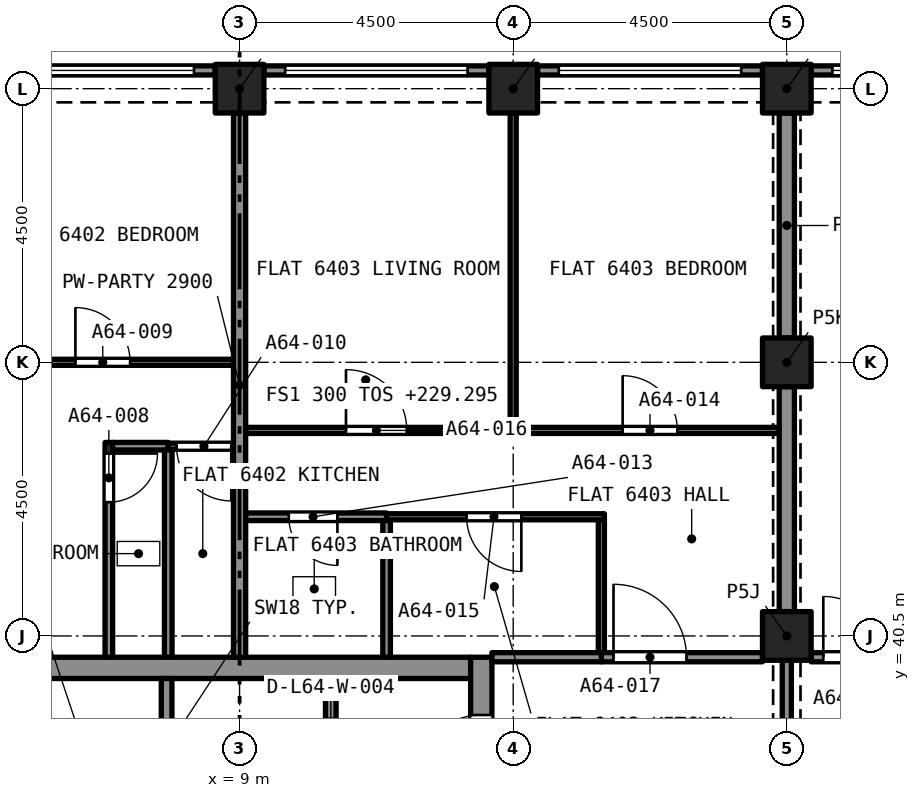
"""IFC4 building model, lengths in metres.
Left out: names, types, materials, properties, quantities, classifications, styles, units other than length and angle.
Written with IfcOpenShell. Run it as: python <this file> out.ifc"""

import sys

from ifc_helpers import new_model, si_unit, direction, frame, frame_2d, origin, origin_2d, place, context, subcontext, project, spatial, rectangle, extrude, element, fill, save


model = new_model("IFC4")
c1 = context("Model", 3, precision=1e-05, world=origin(), true_north=direction((0.0, 1.0)))
c2 = subcontext(c1, "Body", "Model", "MODEL_VIEW")
j1 = project(units=[si_unit("LENGTHUNIT", "METRE"), si_unit("PLANEANGLEUNIT", "RADIAN")], contexts=[c1])
p1 = place(None, origin())
s1 = spatial("IfcSite", under=j1, at=p1, CompositionType="ELEMENT")
p2 = place(p1, origin())
s2 = spatial("IfcBuilding", under=s1, at=p2, CompositionType="ELEMENT")
p3 = place(p2, frame((0.0, 0.0, 229.295)))
s3 = spatial("IfcBuildingStorey", under=s2, at=p3, CompositionType="ELEMENT", Elevation=229.295)
for number, where, z_axis, x_axis in (
    (1, (18.0, 40.5, 0.0), (0.0, 0.0, 1.0), (1.0, 0.0, 0.0)),
    (2, (18.0, 45.0, 0.0), (0.0, 0.0, 1.0), (1.0, 0.0, 0.0)),
    (3, (9.0, 49.5, 0.0), (0.0, 0.0, 1.0), (1.0, 0.0, 0.0)),
    (4, (13.5, 49.5, 0.0), (0.0, 0.0, 1.0), (1.0, 0.0, 0.0)),
    (5, (18.0, 49.5, 0.0), (0.0, 0.0, 1.0), (1.0, 0.0, 0.0)),
):
    element("IfcColumn", number, at=place(p3, frame(where, z_axis=z_axis, x_axis=x_axis)), inside=s3, PredefinedType="COLUMN", context=c2, shape_type="SweptSolid", body=[
        extrude(rectangle(XDim=0.8, YDim=0.8, at=origin_2d()), origin(), (0.0, 0.0, 1.0), 3.2),
    ])
p4 = place(p3, frame((5.2, 39.975, 0.0), z_axis=(0.0, 0.0, 1.0), x_axis=(1.0, 0.0, 0.0)))
e6 = element("IfcWall", 6, at=p4, inside=s3, PredefinedType="SOLIDWALL", context=c2, shape_type="SweptSolid", body=[
    extrude(rectangle(XDim=7.6, YDim=0.35, at=frame_2d((3.8, 0.0))), origin(), (0.0, 0.0, 1.0), 3.2),
])
p5 = place(p3, frame((12.975, 27.35, 0.0), z_axis=(0.0, 0.0, 1.0), x_axis=(0.0, 1.0, 0.0)))
e7 = element("IfcWall", 7, at=p5, inside=s3, PredefinedType="SOLIDWALL", context=c2, shape_type="SweptSolid", body=[
    extrude(rectangle(XDim=12.8, YDim=0.35, at=frame_2d((6.4, 0.0))), origin(), (0.0, 0.0, 1.0), 3.2),
])
p6 = place(p5, frame((10.75, 0.0, 0.0)))
e8 = element("IfcOpeningElement", 8, at=p6, cuts=e7, PredefinedType="OPENING", context=c2, shape_type="SweptSolid", body=[
    extrude(rectangle(XDim=1.1, YDim=2.1, at=frame_2d((0.55, 1.05))), frame((0.0, 0.185, 0.0), z_axis=(0.0, -1.0, 0.0), x_axis=(1.0, 0.0, 0.0)), (0.0, 0.0, 1.0), 0.37),
])
p7 = place(p5, frame((8.6, 0.0, 0.0)))
e9 = element("IfcOpeningElement", 9, at=p7, cuts=e7, PredefinedType="OPENING", context=c2, shape_type="SweptSolid", body=[
    extrude(rectangle(XDim=1.2, YDim=2.1, at=frame_2d((0.6, 1.05))), frame((0.0, 0.185, 0.0), z_axis=(0.0, -1.0, 0.0), x_axis=(1.0, 0.0, 0.0)), (0.0, 0.0, 1.0), 0.37),
])
p8 = place(p3, frame((18.4, 49.8, 0.0), z_axis=(0.0, 0.0, 1.0), x_axis=(1.0, 0.0, 0.0)))
e10 = element("IfcWall", 10, at=p8, inside=s3, PredefinedType="SOLIDWALL", context=c2, shape_type="SweptSolid", body=[
    extrude(rectangle(XDim=3.7, YDim=0.15, at=frame_2d((1.85, 0.0))), origin(), (0.0, 0.0, 1.0), 3.2),
])
p9 = place(p8, frame((0.35, 0.0, 0.45)))
e11 = element("IfcOpeningElement", 11, at=p9, cuts=e10, PredefinedType="OPENING", context=c2, shape_type="SweptSolid", body=[
    extrude(rectangle(XDim=3.0, YDim=1.95, at=frame_2d((1.5, 0.975))), frame((0.0, 0.085, 0.0), z_axis=(0.0, -1.0, 0.0), x_axis=(1.0, 0.0, 0.0)), (0.0, 0.0, 1.0), 0.17),
])
p10 = place(p3, frame((13.9, 49.8, 0.0), z_axis=(0.0, 0.0, 1.0), x_axis=(1.0, 0.0, 0.0)))
e12 = element("IfcWall", 12, at=p10, inside=s3, PredefinedType="SOLIDWALL", context=c2, shape_type="SweptSolid", body=[
    extrude(rectangle(XDim=3.7, YDim=0.15, at=frame_2d((1.85, 0.0))), origin(), (0.0, 0.0, 1.0), 3.2),
])
p11 = place(p10, frame((0.35, 0.0, 0.45)))
e13 = element("IfcOpeningElement", 13, at=p11, cuts=e12, PredefinedType="OPENING", context=c2, shape_type="SweptSolid", body=[
    extrude(rectangle(XDim=3.0, YDim=1.95, at=frame_2d((1.5, 0.975))), frame((0.0, 0.085, 0.0), z_axis=(0.0, -1.0, 0.0), x_axis=(1.0, 0.0, 0.0)), (0.0, 0.0, 1.0), 0.17),
])
p12 = place(p3, frame((9.4, 49.8, 0.0), z_axis=(0.0, 0.0, 1.0), x_axis=(1.0, 0.0, 0.0)))
e14 = element("IfcWall", 14, at=p12, inside=s3, PredefinedType="SOLIDWALL", context=c2, shape_type="SweptSolid", body=[
    extrude(rectangle(XDim=3.7, YDim=0.15, at=frame_2d((1.85, 0.0))), origin(), (0.0, 0.0, 1.0), 3.2),
])
p13 = place(p12, frame((0.35, 0.0, 0.45)))
e15 = element("IfcOpeningElement", 15, at=p13, cuts=e14, PredefinedType="OPENING", context=c2, shape_type="SweptSolid", body=[
    extrude(rectangle(XDim=3.0, YDim=1.95, at=frame_2d((1.5, 0.975))), frame((0.0, 0.085, 0.0), z_axis=(0.0, -1.0, 0.0), x_axis=(1.0, 0.0, 0.0)), (0.0, 0.0, 1.0), 0.17),
])
p14 = place(p3, frame((4.9, 49.8, 0.0), z_axis=(0.0, 0.0, 1.0), x_axis=(1.0, 0.0, 0.0)))
e16 = element("IfcWall", 16, at=p14, inside=s3, PredefinedType="SOLIDWALL", context=c2, shape_type="SweptSolid", body=[
    extrude(rectangle(XDim=3.7, YDim=0.15, at=frame_2d((1.85, 0.0))), origin(), (0.0, 0.0, 1.0), 3.2),
])
p15 = place(p14, frame((0.35, 0.0, 0.45)))
e17 = element("IfcOpeningElement", 17, at=p15, cuts=e16, PredefinedType="OPENING", context=c2, shape_type="SweptSolid", body=[
    extrude(rectangle(XDim=3.0, YDim=1.95, at=frame_2d((1.5, 0.975))), frame((0.0, 0.085, 0.0), z_axis=(0.0, -1.0, 0.0), x_axis=(1.0, 0.0, 0.0)), (0.0, 0.0, 1.0), 0.17),
])
p16 = place(p3, frame((6.85, 43.683, 0.0), z_axis=(0.0, 0.0, 1.0), x_axis=(0.0, -1.0, 0.0)))
e18 = element("IfcWall", 18, at=p16, inside=s3, PredefinedType="PARTITIONING", context=c2, shape_type="SweptSolid", body=[
    extrude(rectangle(XDim=3.533, YDim=0.125, at=frame_2d((1.766, 0.0))), origin(), (0.0, 0.0, 1.0), 2.9),
])
p17 = place(p16, frame((0.183, 0.0, 0.0)))
e19 = element("IfcOpeningElement", 19, at=p17, cuts=e18, PredefinedType="OPENING", context=c2, shape_type="SweptSolid", body=[
    extrude(rectangle(XDim=0.8, YDim=2.1, at=frame_2d((0.4, 1.05))), frame((0.0, 0.073, 0.0), z_axis=(0.0, -1.0, 0.0), x_axis=(1.0, 0.0, 0.0)), (0.0, 0.0, 1.0), 0.145),
])
p18 = place(p3, frame((6.913, 43.62, 0.0), z_axis=(0.0, 0.0, 1.0), x_axis=(1.0, 0.0, 0.0)))
e20 = element("IfcWall", 20, at=p18, inside=s3, PredefinedType="PARTITIONING", context=c2, shape_type="SweptSolid", body=[
    extrude(rectangle(XDim=0.915, YDim=0.125, at=frame_2d((0.458, 0.0))), origin(), (0.0, 0.0, 1.0), 2.9),
])
p19 = place(p3, frame((7.827, 40.15, 0.0), z_axis=(0.0, 0.0, 1.0), x_axis=(0.0, 1.0, 0.0)))
e21 = element("IfcWall", 21, at=p19, inside=s3, PredefinedType="PARTITIONING", context=c2, shape_type="SweptSolid", body=[
    extrude(rectangle(XDim=3.408, YDim=0.125, at=frame_2d((1.704, 0.0))), origin(), (0.0, 0.0, 1.0), 2.9),
])
p20 = place(p3, frame((4.5, 45.0, 0.0), z_axis=(0.0, 0.0, 1.0), x_axis=(1.0, 0.0, 0.0)))
e22 = element("IfcWall", 22, at=p20, inside=s3, PredefinedType="PARTITIONING", context=c2, shape_type="SweptSolid", body=[
    extrude(rectangle(XDim=4.4, YDim=0.1, at=frame_2d((2.2, 0.0))), origin(), (0.0, 0.0, 1.0), 2.9),
])
p21 = place(p20, frame((1.8, 0.0, 0.0)))
e23 = element("IfcOpeningElement", 23, at=p21, cuts=e22, PredefinedType="OPENING", context=c2, shape_type="SweptSolid", body=[
    extrude(rectangle(XDim=0.9, YDim=2.1, at=frame_2d((0.45, 1.05))), frame((0.0, 0.06, 0.0), z_axis=(0.0, -1.0, 0.0), x_axis=(1.0, 0.0, 0.0)), (0.0, 0.0, 1.0), 0.12),
])
p22 = place(p3, frame((8.9, 43.62, 0.0), z_axis=(0.0, 0.0, 1.0), x_axis=(-1.0, 0.0, 0.0)))
e24 = element("IfcWall", 24, at=p22, inside=s3, PredefinedType="PARTITIONING", context=c2, shape_type="SweptSolid", body=[
    extrude(rectangle(XDim=1.073, YDim=0.1, at=frame_2d((0.536, 0.0))), origin(), (0.0, 0.0, 1.0), 2.9),
])
p23 = place(p22, frame((0.036, 0.0, 0.0)))
e25 = element("IfcOpeningElement", 25, at=p23, cuts=e24, PredefinedType="OPENING", context=c2, shape_type="SweptSolid", body=[
    extrude(rectangle(XDim=0.9, YDim=2.1, at=frame_2d((0.45, 1.05))), frame((0.0, 0.06, 0.0), z_axis=(0.0, -1.0, 0.0), x_axis=(1.0, 0.0, 0.0)), (0.0, 0.0, 1.0), 0.12),
])
p24 = place(p3, frame((9.0, 40.15, 0.0), z_axis=(0.0, 0.0, 1.0), x_axis=(0.0, 1.0, 0.0)))
e26 = element("IfcWall", 26, at=p24, inside=s3, PredefinedType="PARTITIONING", context=c2, shape_type="SweptSolid", body=[
    extrude(rectangle(XDim=8.95, YDim=0.2, at=frame_2d((4.475, 0.0))), origin(), (0.0, 0.0, 1.0), 2.9),
])
p25 = place(p3, frame((11.418, 42.46, 0.0), z_axis=(0.0, 0.0, 1.0), x_axis=(-1.0, 0.0, 0.0)))
e27 = element("IfcWall", 27, at=p25, inside=s3, PredefinedType="PARTITIONING", context=c2, shape_type="SweptSolid", body=[
    extrude(rectangle(XDim=2.318, YDim=0.125, at=frame_2d((1.159, 0.0))), origin(), (0.0, 0.0, 1.0), 2.9),
])
p26 = place(p25, frame((0.809, 0.0, 0.0)))
e28 = element("IfcOpeningElement", 28, at=p26, cuts=e27, PredefinedType="OPENING", context=c2, shape_type="SweptSolid", body=[
    extrude(rectangle(XDim=0.8, YDim=2.1, at=frame_2d((0.4, 1.05))), frame((0.0, 0.073, 0.0), z_axis=(0.0, -1.0, 0.0), x_axis=(1.0, 0.0, 0.0)), (0.0, 0.0, 1.0), 0.145),
])
p27 = place(p3, frame((11.418, 40.15, 0.0), z_axis=(0.0, 0.0, 1.0), x_axis=(0.0, 1.0, 0.0)))
e29 = element("IfcWall", 29, at=p27, inside=s3, PredefinedType="PARTITIONING", context=c2, shape_type="SweptSolid", body=[
    extrude(rectangle(XDim=2.248, YDim=0.125, at=frame_2d((1.124, 0.0))), origin(), (0.0, 0.0, 1.0), 2.9),
])
p28 = place(p3, frame((13.5, 43.88, 0.0), z_axis=(0.0, 0.0, 1.0), x_axis=(1.0, 0.0, 0.0)))
e30 = element("IfcWall", 30, at=p28, inside=s3, PredefinedType="PARTITIONING", context=c2, shape_type="SweptSolid", body=[
    extrude(rectangle(XDim=4.375, YDim=0.1, at=frame_2d((2.188, 0.0))), origin(), (0.0, 0.0, 1.0), 2.9),
])
p29 = place(p28, frame((1.8, 0.0, 0.0)))
e31 = element("IfcOpeningElement", 31, at=p29, cuts=e30, PredefinedType="OPENING", context=c2, shape_type="SweptSolid", body=[
    extrude(rectangle(XDim=0.9, YDim=2.1, at=frame_2d((0.45, 1.05))), frame((0.0, 0.06, 0.0), z_axis=(0.0, -1.0, 0.0), x_axis=(1.0, 0.0, 0.0)), (0.0, 0.0, 1.0), 0.12),
])
p30 = place(p3, frame((13.5, 43.93, 0.0), z_axis=(0.0, 0.0, 1.0), x_axis=(0.0, 1.0, 0.0)))
e32 = element("IfcWall", 32, at=p30, inside=s3, PredefinedType="PARTITIONING", context=c2, shape_type="SweptSolid", body=[
    extrude(rectangle(XDim=5.17, YDim=0.1, at=frame_2d((2.585, 0.0))), origin(), (0.0, 0.0, 1.0), 2.9),
])
p31 = place(p3, frame((18.0, 45.4, 0.0), z_axis=(0.0, 0.0, 1.0), x_axis=(0.0, 1.0, 0.0)))
e33 = element("IfcWall", 33, at=p31, inside=s3, PredefinedType="PARTITIONING", context=c2, shape_type="SweptSolid", body=[
    extrude(rectangle(XDim=3.7, YDim=0.25, at=frame_2d((1.85, 0.0))), origin(), (0.0, 0.0, 1.0), 2.38),
])
p32 = place(p3, frame((14.95, 40.225, 0.0), z_axis=(0.0, 0.0, 1.0), x_axis=(0.0, 1.0, 0.0)))
e34 = element("IfcWall", 34, at=p32, inside=s3, PredefinedType="PARTITIONING", context=c2, shape_type="SweptSolid", body=[
    extrude(rectangle(XDim=2.185, YDim=0.1, at=frame_2d((1.092, 0.0))), origin(), (0.0, 0.0, 1.0), 2.9),
])
p33 = place(p3, frame((15.0, 42.46, 0.0), z_axis=(0.0, 0.0, 1.0), x_axis=(-1.0, 0.0, 0.0)))
e35 = element("IfcWall", 35, at=p33, inside=s3, PredefinedType="PARTITIONING", context=c2, shape_type="SweptSolid", body=[
    extrude(rectangle(XDim=3.582, YDim=0.1, at=frame_2d((1.791, 0.0))), origin(), (0.0, 0.0, 1.0), 2.9),
])
p34 = place(p33, frame((1.366, 0.0, 0.0)))
e36 = element("IfcOpeningElement", 36, at=p34, cuts=e35, PredefinedType="OPENING", context=c2, shape_type="SweptSolid", body=[
    extrude(rectangle(XDim=0.9, YDim=2.1, at=frame_2d((0.45, 1.05))), frame((0.0, 0.06, 0.0), z_axis=(0.0, -1.0, 0.0), x_axis=(1.0, 0.0, 0.0)), (0.0, 0.0, 1.0), 0.12),
])
p35 = place(p3, frame((9.1, 43.88, 0.0), z_axis=(0.0, 0.0, 1.0), x_axis=(1.0, 0.0, 0.0)))
e37 = element("IfcWall", 37, at=p35, inside=s3, PredefinedType="PARTITIONING", context=c2, shape_type="SweptSolid", body=[
    extrude(rectangle(XDim=4.4, YDim=0.1, at=frame_2d((2.2, 0.0))), origin(), (0.0, 0.0, 1.0), 2.9),
])
p36 = place(p35, frame((1.65, 0.0, 0.0)))
e38 = element("IfcOpeningElement", 38, at=p36, cuts=e37, PredefinedType="OPENING", context=c2, shape_type="SweptSolid", body=[
    extrude(rectangle(XDim=1.0, YDim=2.1, at=frame_2d((0.5, 1.05))), frame((0.0, 0.06, 0.0), z_axis=(0.0, -1.0, 0.0), x_axis=(1.0, 0.0, 0.0)), (0.0, 0.0, 1.0), 0.12),
])
p37 = place(p3, frame((18.0, 40.9, 0.0), z_axis=(0.0, 0.0, 1.0), x_axis=(0.0, 1.0, 0.0)))
e39 = element("IfcWall", 39, at=p37, inside=s3, PredefinedType="PARTITIONING", context=c2, shape_type="SweptSolid", body=[
    extrude(rectangle(XDim=3.7, YDim=0.25, at=frame_2d((1.85, 0.0))), origin(), (0.0, 0.0, 1.0), 2.38),
])
p38 = place(p3, frame((14.95, 40.15, 0.0), z_axis=(0.0, 0.0, 1.0), x_axis=(1.0, 0.0, 0.0)))
e40 = element("IfcWall", 40, at=p38, inside=s3, PredefinedType="PARTITIONING", context=c2, shape_type="SweptSolid", body=[
    extrude(rectangle(XDim=2.65, YDim=0.15, at=frame_2d((1.325, 0.0))), origin(), (0.0, 0.0, 1.0), 2.9),
])
p39 = place(p38, frame((0.2, 0.0, 0.0)))
e41 = element("IfcOpeningElement", 41, at=p39, cuts=e40, PredefinedType="OPENING", context=c2, shape_type="SweptSolid", body=[
    extrude(rectangle(XDim=1.2, YDim=2.4, at=frame_2d((0.6, 1.2))), frame((0.0, 0.085, 0.0), z_axis=(0.0, -1.0, 0.0), x_axis=(1.0, 0.0, 0.0)), (0.0, 0.0, 1.0), 0.17),
])
p40 = place(p3, frame((13.15, 40.15, 0.0), z_axis=(0.0, 0.0, 1.0), x_axis=(1.0, 0.0, 0.0)))
e42 = element("IfcWall", 42, at=p40, inside=s3, PredefinedType="PARTITIONING", context=c2, shape_type="SweptSolid", body=[
    extrude(rectangle(XDim=1.8, YDim=0.15, at=frame_2d((0.9, 0.0))), origin(), (0.0, 0.0, 1.0), 2.9),
])
p41 = place(p3, frame((18.4, 40.15, 0.0), z_axis=(0.0, 0.0, 1.0), x_axis=(1.0, 0.0, 0.0)))
e43 = element("IfcWall", 43, at=p41, inside=s3, PredefinedType="PARTITIONING", context=c2, shape_type="SweptSolid", body=[
    extrude(rectangle(XDim=2.2, YDim=0.15, at=frame_2d((1.1, 0.0))), origin(), (0.0, 0.0, 1.0), 2.75),
])
p42 = place(p41, frame((0.2, 0.0, 0.0)))
e44 = element("IfcOpeningElement", 44, at=p42, cuts=e43, PredefinedType="OPENING", context=c2, shape_type="SweptSolid", body=[
    extrude(rectangle(XDim=1.0, YDim=2.1, at=frame_2d((0.5, 1.05))), frame((0.0, 0.085, 0.0), z_axis=(0.0, -1.0, 0.0), x_axis=(1.0, 0.0, 0.0)), (0.0, 0.0, 1.0), 0.17),
])
p43 = place(p3, frame((18.0, 40.1, 0.0), z_axis=(0.0, 0.0, 1.0), x_axis=(0.0, -1.0, 0.0)))
e45 = element("IfcWall", 45, at=p43, inside=s3, PredefinedType="PARTITIONING", context=c2, shape_type="SweptSolid", body=[
    extrude(rectangle(XDim=3.7, YDim=0.15, at=frame_2d((1.85, 0.0))), origin(), (0.0, 0.0, 1.0), 2.38),
])
p44 = place(p43, frame((1.25, 0.0, 0.0)))
e46 = element("IfcOpeningElement", 46, at=p44, cuts=e45, PredefinedType="OPENING", context=c2, shape_type="SweptSolid", body=[
    extrude(rectangle(XDim=1.2, YDim=2.1, at=frame_2d((0.6, 1.05))), frame((0.0, 0.085, 0.0), z_axis=(0.0, -1.0, 0.0), x_axis=(1.0, 0.0, 0.0)), (0.0, 0.0, 1.0), 0.17),
])
p45 = place(p3, frame((7.8, 37.5, 0.0), z_axis=(0.0, 0.0, 1.0), x_axis=(0.0, 1.0, 0.0)))
e47 = element("IfcWall", 47, at=p45, inside=s3, PredefinedType="SOLIDWALL", context=c2, shape_type="SweptSolid", body=[
    extrude(rectangle(XDim=2.3, YDim=0.175, at=frame_2d((1.15, 0.0))), origin(), (0.0, 0.0, 1.0), 2.9),
])
p46 = place(p3, frame((10.5, 37.5, 0.0), z_axis=(0.0, 0.0, 1.0), x_axis=(0.0, 1.0, 0.0)))
e48 = element("IfcWall", 48, at=p46, inside=s3, PredefinedType="SOLIDWALL", context=c2, shape_type="SweptSolid", body=[
    extrude(rectangle(XDim=2.3, YDim=0.175, at=frame_2d((1.15, 0.0))), origin(), (0.0, 0.0, 1.0), 2.9),
])
p47 = place(p46, frame((0.65, 0.0, 0.0)))
e49 = element("IfcOpeningElement", 49, at=p47, cuts=e48, PredefinedType="OPENING", context=c2, shape_type="SweptSolid", body=[
    extrude(rectangle(XDim=1.0, YDim=2.1, at=frame_2d((0.5, 1.05))), frame((0.0, 0.097, 0.0), z_axis=(0.0, -1.0, 0.0), x_axis=(1.0, 0.0, 0.0)), (0.0, 0.0, 1.0), 0.195),
])
p48 = place(p9, origin())
e50 = element("IfcWindow", 50, at=p48, inside=s3, PartitioningType="SINGLE_PANEL", PredefinedType="WINDOW", context=c2, shape_type="SweptSolid", body=[
    extrude(rectangle(XDim=3.0, YDim=1.95, at=frame_2d((1.5, 0.975))), frame((0.0, 0.03, 0.0), z_axis=(0.0, -1.0, 0.0), x_axis=(1.0, 0.0, 0.0)), (0.0, 0.0, 1.0), 0.06),
])
fill(e11, e50)
p49 = place(p11, origin())
e51 = element("IfcWindow", 51, at=p49, inside=s3, PartitioningType="SINGLE_PANEL", PredefinedType="WINDOW", context=c2, shape_type="SweptSolid", body=[
    extrude(rectangle(XDim=3.0, YDim=1.95, at=frame_2d((1.5, 0.975))), frame((0.0, 0.03, 0.0), z_axis=(0.0, -1.0, 0.0), x_axis=(1.0, 0.0, 0.0)), (0.0, 0.0, 1.0), 0.06),
])
fill(e13, e51)
p50 = place(p13, origin())
e52 = element("IfcWindow", 52, at=p50, inside=s3, PartitioningType="SINGLE_PANEL", PredefinedType="WINDOW", context=c2, shape_type="SweptSolid", body=[
    extrude(rectangle(XDim=3.0, YDim=1.95, at=frame_2d((1.5, 0.975))), frame((0.0, 0.03, 0.0), z_axis=(0.0, -1.0, 0.0), x_axis=(1.0, 0.0, 0.0)), (0.0, 0.0, 1.0), 0.06),
])
fill(e15, e52)
p51 = place(p15, origin())
e53 = element("IfcWindow", 53, at=p51, inside=s3, PartitioningType="SINGLE_PANEL", PredefinedType="WINDOW", context=c2, shape_type="SweptSolid", body=[
    extrude(rectangle(XDim=3.0, YDim=1.95, at=frame_2d((1.5, 0.975))), frame((0.0, 0.03, 0.0), z_axis=(0.0, -1.0, 0.0), x_axis=(1.0, 0.0, 0.0)), (0.0, 0.0, 1.0), 0.06),
])
fill(e17, e53)
p52 = place(p17, origin())
e54 = element("IfcDoor", 54, at=p52, inside=s3, OperationType="SINGLE_SWING_LEFT", PredefinedType="DOOR", context=c2, shape_type="SweptSolid", body=[
    extrude(rectangle(XDim=0.8, YDim=2.1, at=frame_2d((0.4, 1.05))), frame((0.0, 0.025, 0.0), z_axis=(0.0, -1.0, 0.0), x_axis=(1.0, 0.0, 0.0)), (0.0, 0.0, 1.0), 0.05),
])
fill(e19, e54)
p53 = place(p21, origin())
e55 = element("IfcDoor", 55, at=p53, inside=s3, OperationType="SINGLE_SWING_RIGHT", PredefinedType="DOOR", context=c2, shape_type="SweptSolid", body=[
    extrude(rectangle(XDim=0.9, YDim=2.1, at=frame_2d((0.45, 1.05))), frame((0.0, 0.025, 0.0), z_axis=(0.0, -1.0, 0.0), x_axis=(1.0, 0.0, 0.0)), (0.0, 0.0, 1.0), 0.05),
])
fill(e23, e55)
p54 = place(p23, origin())
e56 = element("IfcDoor", 56, at=p54, inside=s3, OperationType="SINGLE_SWING_LEFT", PredefinedType="DOOR", context=c2, shape_type="SweptSolid", body=[
    extrude(rectangle(XDim=0.9, YDim=2.1, at=frame_2d((0.45, 1.05))), frame((0.0, 0.025, 0.0), z_axis=(0.0, -1.0, 0.0), x_axis=(1.0, 0.0, 0.0)), (0.0, 0.0, 1.0), 0.05),
])
fill(e25, e56)
p55 = place(p26, origin())
e57 = element("IfcDoor", 57, at=p55, inside=s3, OperationType="SINGLE_SWING_RIGHT", PredefinedType="DOOR", context=c2, shape_type="SweptSolid", body=[
    extrude(rectangle(XDim=0.8, YDim=2.1, at=frame_2d((0.4, 1.05))), frame((0.0, 0.025, 0.0), z_axis=(0.0, -1.0, 0.0), x_axis=(1.0, 0.0, 0.0)), (0.0, 0.0, 1.0), 0.05),
])
fill(e28, e57)
p56 = place(p29, origin())
e58 = element("IfcDoor", 58, at=p56, inside=s3, OperationType="SINGLE_SWING_RIGHT", PredefinedType="DOOR", context=c2, shape_type="SweptSolid", body=[
    extrude(rectangle(XDim=0.9, YDim=2.1, at=frame_2d((0.45, 1.05))), frame((0.0, 0.025, 0.0), z_axis=(0.0, -1.0, 0.0), x_axis=(1.0, 0.0, 0.0)), (0.0, 0.0, 1.0), 0.05),
])
fill(e31, e58)
p57 = place(p34, origin())
e59 = element("IfcDoor", 59, at=p57, inside=s3, OperationType="SINGLE_SWING_RIGHT", PredefinedType="DOOR", context=c2, shape_type="SweptSolid", body=[
    extrude(rectangle(XDim=0.9, YDim=2.1, at=frame_2d((0.45, 1.05))), frame((0.0, 0.025, 0.0), z_axis=(0.0, -1.0, 0.0), x_axis=(1.0, 0.0, 0.0)), (0.0, 0.0, 1.0), 0.05),
])
fill(e36, e59)
p58 = place(p36, origin())
e60 = element("IfcDoor", 60, at=p58, inside=s3, OperationType="SINGLE_SWING_LEFT", PredefinedType="DOOR", context=c2, shape_type="SweptSolid", body=[
    extrude(rectangle(XDim=1.0, YDim=2.1, at=frame_2d((0.5, 1.05))), frame((0.0, 0.025, 0.0), z_axis=(0.0, -1.0, 0.0), x_axis=(1.0, 0.0, 0.0)), (0.0, 0.0, 1.0), 0.05),
])
fill(e38, e60)
p59 = place(p39, origin())
e61 = element("IfcDoor", 61, at=p59, inside=s3, OperationType="SINGLE_SWING_LEFT", PredefinedType="DOOR", context=c2, shape_type="SweptSolid", body=[
    extrude(rectangle(XDim=1.2, YDim=2.4, at=frame_2d((0.6, 1.2))), frame((0.0, 0.025, 0.0), z_axis=(0.0, -1.0, 0.0), x_axis=(1.0, 0.0, 0.0)), (0.0, 0.0, 1.0), 0.05),
])
fill(e41, e61)
p60 = place(p42, origin())
e62 = element("IfcDoor", 62, at=p60, inside=s3, OperationType="SINGLE_SWING_LEFT", PredefinedType="DOOR", context=c2, shape_type="SweptSolid", body=[
    extrude(rectangle(XDim=1.0, YDim=2.1, at=frame_2d((0.5, 1.05))), frame((0.0, 0.025, 0.0), z_axis=(0.0, -1.0, 0.0), x_axis=(1.0, 0.0, 0.0)), (0.0, 0.0, 1.0), 0.05),
])
fill(e44, e62)
p61 = place(p6, origin())
e63 = element("IfcDoor", 63, at=p61, inside=s3, OperationType="SINGLE_SWING_LEFT", PredefinedType="DOOR", context=c2, shape_type="SweptSolid", body=[
    extrude(rectangle(XDim=1.1, YDim=2.1, at=frame_2d((0.55, 1.05))), frame((0.0, 0.025, 0.0), z_axis=(0.0, -1.0, 0.0), x_axis=(1.0, 0.0, 0.0)), (0.0, 0.0, 1.0), 0.05),
])
fill(e8, e63)
save(model, sys.argv[1])
